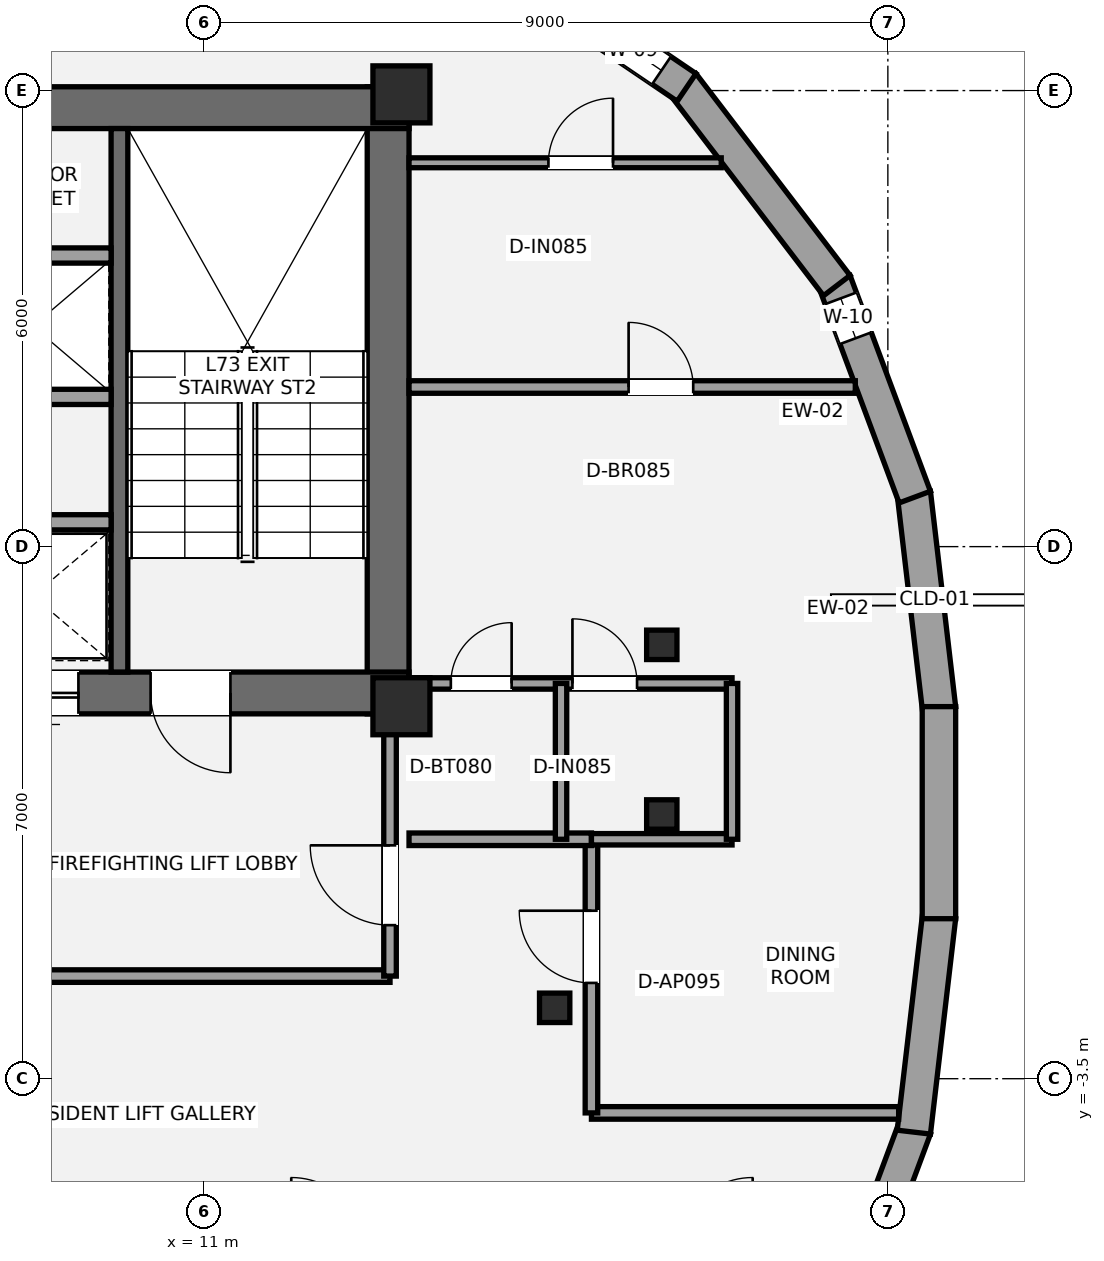
"""IFC4 building model, lengths in metres.
Left out: names, types, materials, properties, quantities, classifications, styles, units other than length and angle.
Written with IfcOpenShell. Run it as: python <this file> out.ifc"""

import sys

from ifc_helpers import new_model, si_unit, direction, frame, frame_2d, origin, origin_2d, place, context, subcontext, project, spatial, rectangle, i_section, extrude, element, fill, save


model = new_model("IFC4")
c1 = context("Model", 3, precision=1e-05, world=origin(), true_north=direction((0.0, 1.0)))
c2 = subcontext(c1, "Body", "Model", "MODEL_VIEW")
j1 = project(units=[si_unit("LENGTHUNIT", "METRE"), si_unit("PLANEANGLEUNIT", "RADIAN")], contexts=[c1])
p1 = place(None, origin())
s1 = spatial("IfcSite", under=j1, at=p1, CompositionType="ELEMENT")
p2 = place(p1, origin())
s2 = spatial("IfcBuilding", under=s1, at=p2, CompositionType="ELEMENT")
p3 = place(p2, frame((0.0, 0.0, 257.25)))
s3 = spatial("IfcBuildingStorey", under=s2, at=p3, CompositionType="ELEMENT", Elevation=257.25)
p4 = place(p3, frame((13.425, 1.3, 0.0), z_axis=(0.0, 0.0, 1.0), x_axis=(0.0, 1.0, 0.0)))
e1 = element("IfcWall", 1, at=p4, inside=s3, PredefinedType="SHEAR", context=c2, shape_type="SweptSolid", body=[
    extrude(rectangle(XDim=8.25, YDim=0.55, at=frame_2d((4.125, 0.0))), origin(), (0.0, 0.0, 1.0), 3.15),
])
p5 = place(p3, frame((4.525, 9.275, 0.0), z_axis=(0.0, 0.0, 1.0), x_axis=(1.0, 0.0, 0.0)))
e2 = element("IfcWall", 2, at=p5, inside=s3, PredefinedType="SHEAR", context=c2, shape_type="SweptSolid", body=[
    extrude(rectangle(XDim=9.175, YDim=0.55, at=frame_2d((4.587, 0.0))), origin(), (0.0, 0.0, 1.0), 3.15),
])
p6 = place(p3, frame((13.7, 1.575, 0.0), z_axis=(0.0, 0.0, 1.0), x_axis=(-1.0, 0.0, 0.0)))
e3 = element("IfcWall", 3, at=p6, inside=s3, PredefinedType="SHEAR", context=c2, shape_type="SweptSolid", body=[
    extrude(rectangle(XDim=8.775, YDim=0.55, at=frame_2d((4.387, 0.0))), origin(), (0.0, 0.0, 1.0), 3.15),
])
p7 = place(p6, frame((2.35, 0.0, 0.0)))
e4 = element("IfcOpeningElement", 4, at=p7, cuts=e3, PredefinedType="OPENING", context=c2, shape_type="SweptSolid", body=[
    extrude(rectangle(XDim=1.05, YDim=2.15, at=frame_2d((0.525, 1.075))), frame((0.0, 0.285, 0.0), z_axis=(0.0, -1.0, 0.0), x_axis=(1.0, 0.0, 0.0)), (0.0, 0.0, 1.0), 0.57),
])
p8 = place(p6, frame((4.35, 0.0, 0.0)))
e5 = element("IfcOpeningElement", 5, at=p8, cuts=e3, PredefinedType="OPENING", context=c2, shape_type="SweptSolid", body=[
    extrude(rectangle(XDim=1.1, YDim=2.2, at=frame_2d((0.55, 1.1))), frame((0.0, 0.285, 0.0), z_axis=(0.0, -1.0, 0.0), x_axis=(1.0, 0.0, 0.0)), (0.0, 0.0, 1.0), 0.57),
])
p9 = place(p3, frame((9.89, 1.85, 0.0), z_axis=(0.0, 0.0, 1.0), x_axis=(0.0, 1.0, 0.0)))
e6 = element("IfcWall", 6, at=p9, inside=s3, PredefinedType="SHEAR", context=c2, shape_type="SweptSolid", body=[
    extrude(rectangle(XDim=7.15, YDim=0.22, at=frame_2d((3.575, 0.0))), origin(), (0.0, 0.0, 1.0), 3.15),
])
for number, where, z_axis, x_axis in (
    (7, (13.6, 1.4, 0.0), (0.0, 0.0, 1.0), (1.0, 0.0, 0.0)),
    (8, (13.6, 9.45, 0.0), (0.0, 0.0, 1.0), (1.0, 0.0, 0.0)),
):
    element("IfcColumn", number, at=place(p3, frame(where, z_axis=z_axis, x_axis=x_axis)), inside=s3, PredefinedType="PILASTER", context=c2, shape_type="SweptSolid", body=[
        extrude(rectangle(XDim=0.75, YDim=0.75, at=origin_2d()), origin(), (0.0, 0.0, 1.0), 3.15),
    ])
for number, where, z_axis, x_axis in (
    (9, (17.026, 2.208, 0.0), (0.0, 0.0, 1.0), (1.0, 0.0, 0.0)),
    (10, (15.616, -2.567, 0.0), (0.0, 0.0, 1.0), (1.0, 0.0, 0.0)),
    (11, (17.026, -0.024, 0.0), (0.0, 0.0, 1.0), (1.0, 0.0, 0.0)),
):
    element("IfcColumn", number, at=place(p3, frame(where, z_axis=z_axis, x_axis=x_axis)), inside=s3, PredefinedType="COLUMN", context=c2, shape_type="SweptSolid", body=[
        extrude(i_section(OverallWidth=0.399, OverallDepth=0.387, WebThickness=0.021, FlangeThickness=0.033, at=origin_2d()), origin(), (0.0, 0.0, 1.0), 3.15),
    ])
p10 = place(p3, frame((20.342, 4.203, 0.0), z_axis=(0.0, 0.0, 1.0), x_axis=(0.116300017341, -0.99321412896, 0.0)))
e12 = element("IfcWall", 12, at=p10, inside=s3, PredefinedType="STANDARD", context=c2, shape_type="SweptSolid", body=[
    extrude(rectangle(XDim=2.853, YDim=0.44, at=frame_2d((1.426, 0.0))), origin(), (0.0, 0.0, 1.0), 2.296),
])
p11 = place(p3, frame((19.297, 6.991, 0.0), z_axis=(0.0, 0.0, 1.0), x_axis=(0.34898554078, -0.937128108813, 0.0)))
e13 = element("IfcWall", 13, at=p11, inside=s3, PredefinedType="STANDARD", context=c2, shape_type="SweptSolid", body=[
    extrude(rectangle(XDim=3.03, YDim=0.44, at=frame_2d((1.515, 0.0))), origin(), (0.0, 0.0, 1.0), 2.296),
])
p12 = place(p11, frame((0.24, 0.0, 0.58)))
e14 = element("IfcOpeningElement", 14, at=p12, cuts=e13, PredefinedType="OPENING", context=c2, shape_type="SweptSolid", body=[
    extrude(rectangle(XDim=0.56, YDim=1.15, at=frame_2d((0.28, 0.575))), frame((0.0, 0.23, 0.0), z_axis=(0.0, -1.0, 0.0), x_axis=(1.0, 0.0, 0.0)), (0.0, 0.0, 1.0), 0.46),
])
p13 = place(p3, frame((17.301, 9.59, 0.0), z_axis=(0.0, 0.0, 1.0), x_axis=(0.606828844818, -0.794832531479, 0.0)))
e15 = element("IfcWall", 15, at=p13, inside=s3, PredefinedType="STANDARD", context=c2, shape_type="SweptSolid", body=[
    extrude(rectangle(XDim=3.341, YDim=0.44, at=frame_2d((1.671, 0.0))), origin(), (0.0, 0.0, 1.0), 2.296),
])
p14 = place(p3, frame((14.218, 11.666, 0.0), z_axis=(0.0, 0.0, 1.0), x_axis=(0.827669406477, -0.561215959842, 0.0)))
e16 = element("IfcWall", 16, at=p14, inside=s3, PredefinedType="STANDARD", context=c2, shape_type="SweptSolid", body=[
    extrude(rectangle(XDim=3.786, YDim=0.44, at=frame_2d((1.893, 0.0))), origin(), (0.0, 0.0, 1.0), 2.296),
])
p15 = place(p14, frame((2.487, 0.0, 0.58)))
e17 = element("IfcOpeningElement", 17, at=p15, cuts=e16, PredefinedType="OPENING", context=c2, shape_type="SweptSolid", body=[
    extrude(rectangle(XDim=0.9, YDim=1.35, at=frame_2d((0.45, 0.675))), frame((0.0, 0.23, 0.0), z_axis=(0.0, -1.0, 0.0), x_axis=(1.0, 0.0, 0.0)), (0.0, 0.0, 1.0), 0.46),
])
p16 = place(p3, frame((20.354, -4.152, 0.0), z_axis=(0.0, 0.0, 1.0), x_axis=(-0.34898554078, -0.937128108813, 0.0)))
e18 = element("IfcWall", 18, at=p16, inside=s3, PredefinedType="STANDARD", context=c2, shape_type="SweptSolid", body=[
    extrude(rectangle(XDim=3.03, YDim=0.44, at=frame_2d((1.515, 0.0))), origin(), (0.0, 0.0, 1.0), 2.296),
])
p17 = place(p3, frame((20.674, -1.369, 0.0), z_axis=(0.0, 0.0, 1.0), x_axis=(-0.116300017341, -0.99321412896, 0.0)))
e19 = element("IfcWall", 19, at=p17, inside=s3, PredefinedType="STANDARD", context=c2, shape_type="SweptSolid", body=[
    extrude(rectangle(XDim=2.853, YDim=0.44, at=frame_2d((1.426, 0.0))), origin(), (0.0, 0.0, 1.0), 2.296),
])
p18 = place(p3, frame((20.672, 1.395, 0.0), z_axis=(0.0, 0.0, 1.0), x_axis=(0.0, -1.0, 0.0)))
e20 = element("IfcWall", 20, at=p18, inside=s3, PredefinedType="STANDARD", context=c2, shape_type="SweptSolid", body=[
    extrude(rectangle(XDim=2.79, YDim=0.44, at=frame_2d((1.395, 0.0))), origin(), (0.0, 0.0, 1.0), 2.296),
])
p19 = place(p3, frame((7.2, -2.15, 0.0), z_axis=(0.0, 0.0, 1.0), x_axis=(1.0, 0.0, 0.0)))
e21 = element("IfcWall", 21, at=p19, inside=s3, PredefinedType="PARTITIONING", context=c2, shape_type="SweptSolid", body=[
    extrude(rectangle(XDim=6.25, YDim=0.165, at=frame_2d((3.125, 0.0))), origin(), (0.0, 0.0, 1.0), 2.93),
])
p20 = place(p3, frame((13.45, -2.15, 0.0), z_axis=(0.0, 0.0, 1.0), x_axis=(0.0, 1.0, 0.0)))
e22 = element("IfcWall", 22, at=p20, inside=s3, PredefinedType="PARTITIONING", context=c2, shape_type="SweptSolid", body=[
    extrude(rectangle(XDim=3.5, YDim=0.165, at=frame_2d((1.75, 0.0))), origin(), (0.0, 0.0, 1.0), 2.383),
])
p21 = place(p20, frame((0.67, 0.0, 0.0)))
e23 = element("IfcOpeningElement", 23, at=p21, cuts=e22, PredefinedType="OPENING", context=c2, shape_type="SweptSolid", body=[
    extrude(rectangle(XDim=1.05, YDim=2.15, at=frame_2d((0.525, 1.075))), frame((0.0, 0.093, 0.0), z_axis=(0.0, -1.0, 0.0), x_axis=(1.0, 0.0, 0.0)), (0.0, 0.0, 1.0), 0.185),
])
p22 = place(p3, frame((5.475, 3.82, 0.0), z_axis=(0.0, 0.0, 1.0), x_axis=(1.0, 0.0, 0.0)))
e24 = element("IfcWall", 24, at=p22, inside=s3, PredefinedType="SOLIDWALL", context=c2, shape_type="SweptSolid", body=[
    extrude(rectangle(XDim=4.305, YDim=0.2, at=frame_2d((2.152, 0.0))), origin(), (0.0, 0.0, 1.0), 2.93),
])
p23 = place(p22, frame((0.65, 0.0, 0.0)))
e25 = element("IfcOpeningElement", 25, at=p23, cuts=e24, PredefinedType="OPENING", context=c2, shape_type="SweptSolid", body=[
    extrude(rectangle(XDim=1.2, YDim=2.2, at=frame_2d((0.6, 1.1))), frame((0.0, 0.11, 0.0), z_axis=(0.0, -1.0, 0.0), x_axis=(1.0, 0.0, 0.0)), (0.0, 0.0, 1.0), 0.22),
])
for number, where, z_axis, x_axis in (
    (26, (5.475, 5.47, 0.0), (0.0, 0.0, 1.0), (1.0, 0.0, 0.0)),
    (27, (5.475, 7.33, 0.0), (0.0, 0.0, 1.0), (1.0, 0.0, 0.0)),
):
    element("IfcWall", number, at=place(p3, frame(where, z_axis=z_axis, x_axis=x_axis)), inside=s3, PredefinedType="SOLIDWALL", context=c2, shape_type="SweptSolid", body=[
        extrude(rectangle(XDim=4.305, YDim=0.2, at=frame_2d((2.152, 0.0))), origin(), (0.0, 0.0, 1.0), 2.93),
    ])
p24 = place(p3, frame((16.1, -3.95, 0.0), z_axis=(0.0, 0.0, 1.0), x_axis=(1.0, 0.0, 0.0)))
e28 = element("IfcWall", 28, at=p24, inside=s3, PredefinedType="PARTITIONING", context=c2, shape_type="SweptSolid", body=[
    extrude(rectangle(XDim=4.042, YDim=0.165, at=frame_2d((2.021, 0.0))), origin(), (0.0, 0.0, 1.0), 2.383),
])
p25 = place(p3, frame((16.1, -3.95, 0.0), z_axis=(0.0, 0.0, 1.0), x_axis=(0.0, 1.0, 0.0)))
e29 = element("IfcWall", 29, at=p25, inside=s3, PredefinedType="PARTITIONING", context=c2, shape_type="SweptSolid", body=[
    extrude(rectangle(XDim=3.6, YDim=0.165, at=frame_2d((1.8, 0.0))), origin(), (0.0, 0.0, 1.0), 2.317),
])
p26 = place(p25, frame((1.71, 0.0, 0.0)))
e30 = element("IfcOpeningElement", 30, at=p26, cuts=e29, PredefinedType="OPENING", context=c2, shape_type="SweptSolid", body=[
    extrude(rectangle(XDim=0.95, YDim=2.15, at=frame_2d((0.475, 1.075))), frame((0.0, 0.093, 0.0), z_axis=(0.0, -1.0, 0.0), x_axis=(1.0, 0.0, 0.0)), (0.0, 0.0, 1.0), 0.185),
])
p27 = place(p3, frame((13.7, -0.35, 0.0), z_axis=(0.0, 0.0, 1.0), x_axis=(1.0, 0.0, 0.0)))
e31 = element("IfcWall", 31, at=p27, inside=s3, PredefinedType="PARTITIONING", context=c2, shape_type="SweptSolid", body=[
    extrude(rectangle(XDim=2.4, YDim=0.165, at=frame_2d((1.2, 0.0))), origin(), (0.0, 0.0, 1.0), 2.383),
])
p28 = place(p3, frame((13.7, 5.6, 0.0), z_axis=(0.0, 0.0, 1.0), x_axis=(1.0, 0.0, 0.0)))
e32 = element("IfcWall", 32, at=p28, inside=s3, PredefinedType="PARTITIONING", context=c2, shape_type="SweptSolid", body=[
    extrude(rectangle(XDim=5.872, YDim=0.165, at=frame_2d((2.936, 0.0))), origin(), (0.0, 0.0, 1.0), 2.383),
])
p29 = place(p28, frame((2.889, 0.0, 0.0)))
e33 = element("IfcOpeningElement", 33, at=p29, cuts=e32, PredefinedType="OPENING", context=c2, shape_type="SweptSolid", body=[
    extrude(rectangle(XDim=0.85, YDim=2.1, at=frame_2d((0.425, 1.05))), frame((0.0, 0.093, 0.0), z_axis=(0.0, -1.0, 0.0), x_axis=(1.0, 0.0, 0.0)), (0.0, 0.0, 1.0), 0.185),
])
p30 = place(p3, frame((13.7, 1.7, 0.0), z_axis=(0.0, 0.0, 1.0), x_axis=(1.0, 0.0, 0.0)))
e34 = element("IfcWall", 34, at=p30, inside=s3, PredefinedType="PLUMBINGWALL", context=c2, shape_type="SweptSolid", body=[
    extrude(rectangle(XDim=4.25, YDim=0.15, at=frame_2d((2.125, 0.0))), origin(), (0.0, 0.0, 1.0), 2.383),
])
p31 = place(p30, frame((0.55, 0.0, 0.0)))
e35 = element("IfcOpeningElement", 35, at=p31, cuts=e34, PredefinedType="OPENING", context=c2, shape_type="SweptSolid", body=[
    extrude(rectangle(XDim=0.8, YDim=2.1, at=frame_2d((0.4, 1.05))), frame((0.0, 0.085, 0.0), z_axis=(0.0, -1.0, 0.0), x_axis=(1.0, 0.0, 0.0)), (0.0, 0.0, 1.0), 0.17),
])
p32 = place(p30, frame((2.15, 0.0, 0.0)))
e36 = element("IfcOpeningElement", 36, at=p32, cuts=e34, PredefinedType="OPENING", context=c2, shape_type="SweptSolid", body=[
    extrude(rectangle(XDim=0.85, YDim=2.1, at=frame_2d((0.425, 1.05))), frame((0.0, 0.085, 0.0), z_axis=(0.0, -1.0, 0.0), x_axis=(1.0, 0.0, 0.0)), (0.0, 0.0, 1.0), 0.17),
])
p33 = place(p3, frame((16.1, -0.35, 0.0), z_axis=(0.0, 0.0, 1.0), x_axis=(1.0, 0.0, 0.0)))
e37 = element("IfcWall", 37, at=p33, inside=s3, PredefinedType="PLUMBINGWALL", context=c2, shape_type="SweptSolid", body=[
    extrude(rectangle(XDim=1.85, YDim=0.15, at=frame_2d((0.925, 0.0))), origin(), (0.0, 0.0, 1.0), 2.383),
])
p34 = place(p3, frame((15.7, -0.35, 0.0), z_axis=(0.0, 0.0, 1.0), x_axis=(0.0, 1.0, 0.0)))
e38 = element("IfcWall", 38, at=p34, inside=s3, PredefinedType="PLUMBINGWALL", context=c2, shape_type="SweptSolid", body=[
    extrude(rectangle(XDim=2.05, YDim=0.15, at=frame_2d((1.025, 0.0))), origin(), (0.0, 0.0, 1.0), 2.93),
])
p35 = place(p3, frame((17.95, -0.35, 0.0), z_axis=(0.0, 0.0, 1.0), x_axis=(0.0, 1.0, 0.0)))
e39 = element("IfcWall", 39, at=p35, inside=s3, PredefinedType="PLUMBINGWALL", context=c2, shape_type="SweptSolid", body=[
    extrude(rectangle(XDim=2.05, YDim=0.15, at=frame_2d((1.025, 0.0))), origin(), (0.0, 0.0, 1.0), 2.383),
])
p36 = place(p3, frame((13.7, 8.55, 0.0), z_axis=(0.0, 0.0, 1.0), x_axis=(1.0, 0.0, 0.0)))
e40 = element("IfcWall", 40, at=p36, inside=s3, PredefinedType="PARTITIONING", context=c2, shape_type="SweptSolid", body=[
    extrude(rectangle(XDim=4.108, YDim=0.13, at=frame_2d((2.054, 0.0))), origin(), (0.0, 0.0, 1.0), 2.383),
])
p37 = place(p36, frame((1.834, 0.0, 0.0)))
e41 = element("IfcOpeningElement", 41, at=p37, cuts=e40, PredefinedType="OPENING", context=c2, shape_type="SweptSolid", body=[
    extrude(rectangle(XDim=0.85, YDim=2.1, at=frame_2d((0.425, 1.05))), frame((0.0, 0.075, 0.0), z_axis=(0.0, -1.0, 0.0), x_axis=(1.0, 0.0, 0.0)), (0.0, 0.0, 1.0), 0.15),
])
p38 = place(p15, origin())
e42 = element("IfcWindow", 42, at=p38, inside=s3, PartitioningType="SINGLE_PANEL", PredefinedType="WINDOW", context=c2, shape_type="SweptSolid", body=[
    extrude(rectangle(XDim=0.9, YDim=1.35, at=frame_2d((0.45, 0.675))), frame((0.0, -0.01, 0.0), z_axis=(0.0, -1.0, 0.0), x_axis=(1.0, 0.0, 0.0)), (0.0, 0.0, 1.0), 0.06),
])
fill(e17, e42)
p39 = place(p12, origin())
e43 = element("IfcWindow", 43, at=p39, inside=s3, PartitioningType="SINGLE_PANEL", PredefinedType="WINDOW", context=c2, shape_type="SweptSolid", body=[
    extrude(rectangle(XDim=0.56, YDim=1.15, at=frame_2d((0.28, 0.575))), frame((0.0, -0.01, 0.0), z_axis=(0.0, -1.0, 0.0), x_axis=(1.0, 0.0, 0.0)), (0.0, 0.0, 1.0), 0.06),
])
fill(e14, e43)
p40 = place(p7, origin())
e44 = element("IfcDoor", 44, at=p40, inside=s3, OperationType="SINGLE_SWING_LEFT", PredefinedType="DOOR", context=c2, shape_type="SweptSolid", body=[
    extrude(rectangle(XDim=1.05, YDim=2.15, at=frame_2d((0.525, 1.075))), frame((0.0, 0.025, 0.0), z_axis=(0.0, -1.0, 0.0), x_axis=(1.0, 0.0, 0.0)), (0.0, 0.0, 1.0), 0.05),
])
fill(e4, e44)
p41 = place(p21, origin())
e45 = element("IfcDoor", 45, at=p41, inside=s3, OperationType="SINGLE_SWING_RIGHT", PredefinedType="DOOR", context=c2, shape_type="SweptSolid", body=[
    extrude(rectangle(XDim=1.05, YDim=2.15, at=frame_2d((0.525, 1.075))), frame((0.0, 0.025, 0.0), z_axis=(0.0, -1.0, 0.0), x_axis=(1.0, 0.0, 0.0)), (0.0, 0.0, 1.0), 0.05),
])
fill(e23, e45)
p42 = place(p8, origin())
e46 = element("IfcDoor", 46, at=p42, inside=s3, OperationType="SLIDING_TO_LEFT", PredefinedType="DOOR", context=c2, shape_type="SweptSolid", body=[
    extrude(rectangle(XDim=1.1, YDim=2.2, at=frame_2d((0.55, 1.1))), frame((0.0, 0.025, 0.0), z_axis=(0.0, -1.0, 0.0), x_axis=(1.0, 0.0, 0.0)), (0.0, 0.0, 1.0), 0.05),
])
fill(e5, e46)
p43 = place(p26, origin())
e47 = element("IfcDoor", 47, at=p43, inside=s3, OperationType="SINGLE_SWING_RIGHT", PredefinedType="DOOR", context=c2, shape_type="SweptSolid", body=[
    extrude(rectangle(XDim=0.95, YDim=2.15, at=frame_2d((0.475, 1.075))), frame((0.0, 0.025, 0.0), z_axis=(0.0, -1.0, 0.0), x_axis=(1.0, 0.0, 0.0)), (0.0, 0.0, 1.0), 0.05),
])
fill(e30, e47)
p44 = place(p31, origin())
e48 = element("IfcDoor", 48, at=p44, inside=s3, OperationType="SINGLE_SWING_RIGHT", PredefinedType="DOOR", context=c2, shape_type="SweptSolid", body=[
    extrude(rectangle(XDim=0.8, YDim=2.1, at=frame_2d((0.4, 1.05))), frame((0.0, 0.025, 0.0), z_axis=(0.0, -1.0, 0.0), x_axis=(1.0, 0.0, 0.0)), (0.0, 0.0, 1.0), 0.05),
])
fill(e35, e48)
p45 = place(p32, origin())
e49 = element("IfcDoor", 49, at=p45, inside=s3, OperationType="SINGLE_SWING_LEFT", PredefinedType="DOOR", context=c2, shape_type="SweptSolid", body=[
    extrude(rectangle(XDim=0.85, YDim=2.1, at=frame_2d((0.425, 1.05))), frame((0.0, 0.025, 0.0), z_axis=(0.0, -1.0, 0.0), x_axis=(1.0, 0.0, 0.0)), (0.0, 0.0, 1.0), 0.05),
])
fill(e36, e49)
p46 = place(p29, origin())
e50 = element("IfcDoor", 50, at=p46, inside=s3, OperationType="SINGLE_SWING_LEFT", PredefinedType="DOOR", context=c2, shape_type="SweptSolid", body=[
    extrude(rectangle(XDim=0.85, YDim=2.1, at=frame_2d((0.425, 1.05))), frame((0.0, 0.025, 0.0), z_axis=(0.0, -1.0, 0.0), x_axis=(1.0, 0.0, 0.0)), (0.0, 0.0, 1.0), 0.05),
])
fill(e33, e50)
p47 = place(p37, origin())
e51 = element("IfcDoor", 51, at=p47, inside=s3, OperationType="SINGLE_SWING_RIGHT", PredefinedType="DOOR", context=c2, shape_type="SweptSolid", body=[
    extrude(rectangle(XDim=0.85, YDim=2.1, at=frame_2d((0.425, 1.05))), frame((0.0, 0.025, 0.0), z_axis=(0.0, -1.0, 0.0), x_axis=(1.0, 0.0, 0.0)), (0.0, 0.0, 1.0), 0.05),
])
fill(e41, e51)
save(model, sys.argv[1])
